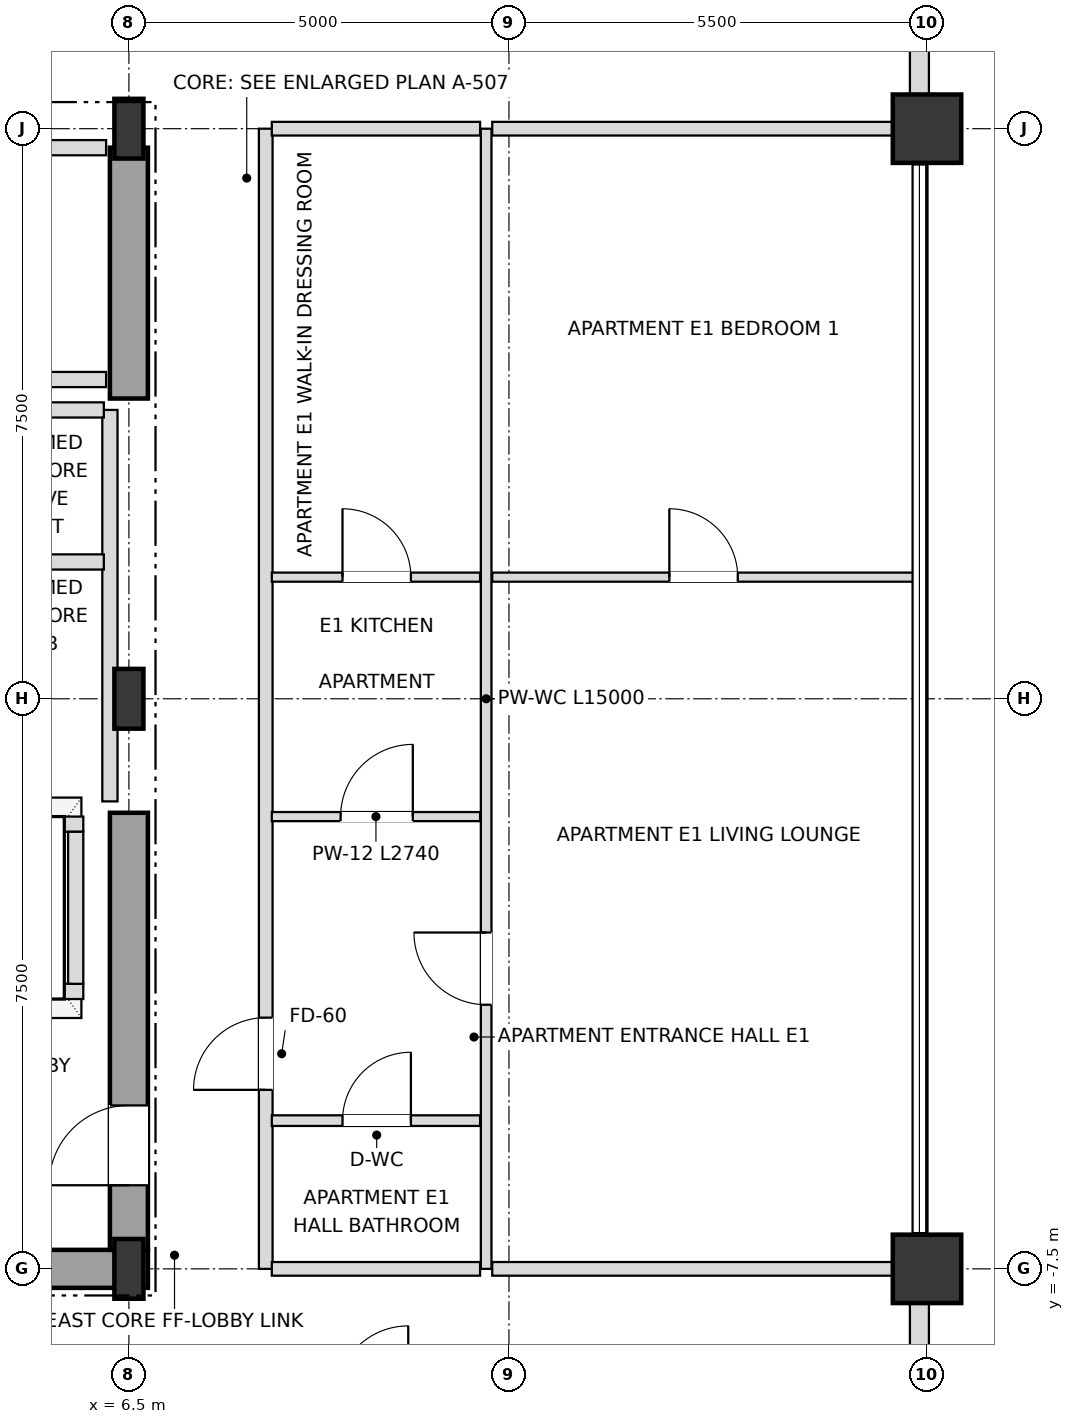
"""IFC4 building model, lengths in metres.
Left out: names, types, materials, properties, quantities, classifications, styles, units other than length and angle.
Written with IfcOpenShell. Run it as: python <this file> out.ifc"""

import sys

from ifc_helpers import new_model, si_unit, direction, frame, frame_2d, origin, origin_2d, place, context, subcontext, project, spatial, rectangle, i_section, extrude, element, fill, save


model = new_model("IFC4")
c1 = context("Model", 3, precision=1e-05, world=origin(), true_north=direction((0.0, 1.0)))
c2 = subcontext(c1, "Body", "Model", "MODEL_VIEW")
j1 = project(units=[si_unit("LENGTHUNIT", "METRE"), si_unit("PLANEANGLEUNIT", "RADIAN")], contexts=[c1])
p1 = place(None, origin())
s1 = spatial("IfcSite", under=j1, at=p1, CompositionType="ELEMENT")
p2 = place(p1, origin())
s2 = spatial("IfcBuilding", under=s1, at=p2, CompositionType="ELEMENT")
p3 = place(p2, frame((0.0, 0.0, 287.1)))
s3 = spatial("IfcBuildingStorey", under=s2, at=p3, CompositionType="ELEMENT", Elevation=287.1)
for number, where, z_axis, x_axis in (
    (1, (6.5, -7.5, 0.0), (0.0, 0.0, 1.0), (1.0, 0.0, 0.0)),
    (2, (6.5, 0.0, 0.0), (0.0, 0.0, 1.0), (1.0, 0.0, 0.0)),
    (3, (6.5, 7.5, 0.0), (0.0, 0.0, 1.0), (1.0, 0.0, 0.0)),
):
    element("IfcColumn", number, at=place(p3, frame(where, z_axis=z_axis, x_axis=x_axis)), inside=s3, PredefinedType="COLUMN", context=c2, shape_type="SweptSolid", body=[
        extrude(i_section(OverallWidth=0.382, OverallDepth=0.786, WebThickness=0.02, FlangeThickness=0.033, at=origin_2d()), origin(), (0.0, 0.0, 1.0), 3.6),
    ])
for number, where, z_axis, x_axis in (
    (4, (17.0, -7.5, 0.0), (0.0, 0.0, 1.0), (1.0, 0.0, 0.0)),
    (5, (17.0, 7.5, 0.0), (0.0, 0.0, 1.0), (1.0, 0.0, 0.0)),
):
    element("IfcColumn", number, at=place(p3, frame(where, z_axis=z_axis, x_axis=x_axis)), inside=s3, PredefinedType="USERDEFINED", context=c2, shape_type="SweptSolid", body=[
        extrude(rectangle(XDim=0.9, YDim=0.9, at=origin_2d()), origin(), (0.0, 0.0, 1.0), 3.6),
    ])
p4 = place(p3, frame((16.9, -12.555, 0.0), z_axis=(0.0, 0.0, 1.0), x_axis=(0.0, 1.0, 0.0)))
e6 = element("IfcWall", 6, at=p4, inside=s3, PredefinedType="SOLIDWALL", context=c2, shape_type="SweptSolid", body=[
    extrude(rectangle(XDim=4.61, YDim=0.25, at=frame_2d((2.305, 0.0))), origin(), (0.0, 0.0, 1.0), 2.748),
])
p5 = place(p4, frame((1.405, 0.0, 0.72)))
e7 = element("IfcOpeningElement", 7, at=p5, cuts=e6, PredefinedType="OPENING", context=c2, shape_type="SweptSolid", body=[
    extrude(rectangle(XDim=1.8, YDim=1.68, at=frame_2d((0.9, 0.84))), frame((0.0, 0.135, 0.0), z_axis=(0.0, -1.0, 0.0), x_axis=(1.0, 0.0, 0.0)), (0.0, 0.0, 1.0), 0.27),
])
p6 = place(p3, frame((16.9, 7.945, 0.0), z_axis=(0.0, 0.0, 1.0), x_axis=(0.0, 1.0, 0.0)))
e8 = element("IfcWall", 8, at=p6, inside=s3, PredefinedType="SOLIDWALL", context=c2, shape_type="SweptSolid", body=[
    extrude(rectangle(XDim=4.61, YDim=0.25, at=frame_2d((2.305, 0.0))), origin(), (0.0, 0.0, 1.0), 2.748),
])
p7 = place(p6, frame((1.405, 0.0, 0.72)))
e9 = element("IfcOpeningElement", 9, at=p7, cuts=e8, PredefinedType="OPENING", context=c2, shape_type="SweptSolid", body=[
    extrude(rectangle(XDim=1.8, YDim=1.68, at=frame_2d((0.9, 0.84))), frame((0.0, 0.135, 0.0), z_axis=(0.0, -1.0, 0.0), x_axis=(1.0, 0.0, 0.0)), (0.0, 0.0, 1.0), 0.27),
])
p8 = place(p3, frame((0.0, -7.5, 0.0), z_axis=(0.0, 0.0, 1.0), x_axis=(1.0, 0.0, 0.0)))
e10 = element("IfcWall", 10, at=p8, inside=s3, PredefinedType="SHEAR", context=c2, shape_type="SweptSolid", body=[
    extrude(rectangle(XDim=6.75, YDim=0.5, at=frame_2d((3.375, 0.0))), origin(), (0.0, 0.0, 1.0), 3.38),
])
p9 = place(p3, frame((6.5, -7.25, 0.0), z_axis=(0.0, 0.0, 1.0), x_axis=(0.0, 1.0, 0.0)))
e11 = element("IfcWall", 11, at=p9, inside=s3, PredefinedType="SHEAR", context=c2, shape_type="SweptSolid", body=[
    extrude(rectangle(XDim=5.75, YDim=0.5, at=frame_2d((2.875, 0.0))), origin(), (0.0, 0.0, 1.0), 3.38),
])
p10 = place(p9, frame((0.85, 0.0, 0.0)))
e12 = element("IfcOpeningElement", 12, at=p10, cuts=e11, PredefinedType="OPENING", context=c2, shape_type="SweptSolid", body=[
    extrude(rectangle(XDim=1.05, YDim=2.15, at=frame_2d((0.525, 1.075))), frame((0.0, 0.26, 0.0), z_axis=(0.0, -1.0, 0.0), x_axis=(1.0, 0.0, 0.0)), (0.0, 0.0, 1.0), 0.52),
])
p11 = place(p3, frame((6.5, 3.95, 0.0), z_axis=(0.0, 0.0, 1.0), x_axis=(0.0, 1.0, 0.0)))
e13 = element("IfcWall", 13, at=p11, inside=s3, PredefinedType="SHEAR", context=c2, shape_type="SweptSolid", body=[
    extrude(rectangle(XDim=3.3, YDim=0.5, at=frame_2d((1.65, 0.0))), origin(), (0.0, 0.0, 1.0), 3.38),
])
p12 = place(p3, frame((1.8, -3.85, 0.0), z_axis=(0.0, 0.0, 1.0), x_axis=(1.0, 0.0, 0.0)))
e14 = element("IfcWall", 14, at=p12, inside=s3, PredefinedType="SOLIDWALL", context=c2, shape_type="SweptSolid", body=[
    extrude(rectangle(XDim=4.1, YDim=0.2, at=frame_2d((2.05, 0.0))), origin(), (0.0, 0.0, 1.0), 3.38),
])
p13 = place(p12, frame((0.45, 0.0, 0.0)))
e15 = element("IfcOpeningElement", 15, at=p13, cuts=e14, PredefinedType="OPENING", context=c2, shape_type="SweptSolid", body=[
    extrude(rectangle(XDim=1.2, YDim=2.2, at=frame_2d((0.6, 1.1))), frame((0.0, 0.11, 0.0), z_axis=(0.0, -1.0, 0.0), x_axis=(1.0, 0.0, 0.0)), (0.0, 0.0, 1.0), 0.22),
])
p14 = place(p12, frame((2.45, 0.0, 0.0)))
e16 = element("IfcOpeningElement", 16, at=p14, cuts=e14, PredefinedType="OPENING", context=c2, shape_type="SweptSolid", body=[
    extrude(rectangle(XDim=1.2, YDim=2.2, at=frame_2d((0.6, 1.1))), frame((0.0, 0.11, 0.0), z_axis=(0.0, -1.0, 0.0), x_axis=(1.0, 0.0, 0.0)), (0.0, 0.0, 1.0), 0.22),
])
p15 = place(p3, frame((1.8, -1.65, 0.0), z_axis=(0.0, 0.0, 1.0), x_axis=(1.0, 0.0, 0.0)))
e17 = element("IfcWall", 17, at=p15, inside=s3, PredefinedType="SOLIDWALL", context=c2, shape_type="SweptSolid", body=[
    extrude(rectangle(XDim=4.1, YDim=0.2, at=frame_2d((2.05, 0.0))), origin(), (0.0, 0.0, 1.0), 3.38),
])
p16 = place(p3, frame((5.8, -3.75, 0.0), z_axis=(0.0, 0.0, 1.0), x_axis=(0.0, 1.0, 0.0)))
e18 = element("IfcWall", 18, at=p16, inside=s3, PredefinedType="SOLIDWALL", context=c2, shape_type="SweptSolid", body=[
    extrude(rectangle(XDim=2.0, YDim=0.2, at=frame_2d((1.0, 0.0))), origin(), (0.0, 0.0, 1.0), 3.38),
])
p17 = place(p3, frame((6.25, -1.35, 0.0), z_axis=(0.0, 0.0, 1.0), x_axis=(0.0, 1.0, 0.0)))
e19 = element("IfcWall", 19, at=p17, inside=s3, PredefinedType="SOLIDWALL", context=c2, shape_type="SweptSolid", body=[
    extrude(rectangle(XDim=5.15, YDim=0.2, at=frame_2d((2.575, 0.0))), origin(), (0.0, 0.0, 1.0), 3.38),
])
p18 = place(p3, frame((8.3, -7.5, 0.0), z_axis=(0.0, 0.0, 1.0), x_axis=(0.0, 1.0, 0.0)))
e20 = element("IfcWall", 20, at=p18, inside=s3, PredefinedType="PARTITIONING", context=c2, shape_type="SweptSolid", body=[
    extrude(rectangle(XDim=15.0, YDim=0.18, at=frame_2d((7.5, 0.0))), origin(), (0.0, 0.0, 1.0), 3.38),
])
p19 = place(p18, frame((2.355, 0.0, 0.0)))
e21 = element("IfcOpeningElement", 21, at=p19, cuts=e20, PredefinedType="OPENING", context=c2, shape_type="SweptSolid", body=[
    extrude(rectangle(XDim=0.95, YDim=2.15, at=frame_2d((0.475, 1.075))), frame((0.0, 0.1, 0.0), z_axis=(0.0, -1.0, 0.0), x_axis=(1.0, 0.0, 0.0)), (0.0, 0.0, 1.0), 0.2),
])
p20 = place(p3, frame((11.2, -7.5, 0.0), z_axis=(0.0, 0.0, 1.0), x_axis=(0.0, 1.0, 0.0)))
e22 = element("IfcWall", 22, at=p20, inside=s3, PredefinedType="PARTITIONING", context=c2, shape_type="SweptSolid", body=[
    extrude(rectangle(XDim=15.0, YDim=0.14, at=frame_2d((7.5, 0.0))), origin(), (0.0, 0.0, 1.0), 3.38),
])
p21 = place(p20, frame((3.475, 0.0, 0.0)))
e23 = element("IfcOpeningElement", 23, at=p21, cuts=e22, PredefinedType="OPENING", context=c2, shape_type="SweptSolid", body=[
    extrude(rectangle(XDim=0.95, YDim=2.1, at=frame_2d((0.475, 1.05))), frame((0.0, 0.08, 0.0), z_axis=(0.0, -1.0, 0.0), x_axis=(1.0, 0.0, 0.0)), (0.0, 0.0, 1.0), 0.16),
])
p22 = place(p3, frame((8.38, -7.5, 0.0), z_axis=(0.0, 0.0, 1.0), x_axis=(1.0, 0.0, 0.0)))
e24 = element("IfcWall", 24, at=p22, inside=s3, PredefinedType="PARTITIONING", context=c2, shape_type="SweptSolid", body=[
    extrude(rectangle(XDim=2.74, YDim=0.18, at=frame_2d((1.37, 0.0))), origin(), (0.0, 0.0, 1.0), 2.826),
])
p23 = place(p3, frame((11.28, -7.5, 0.0), z_axis=(0.0, 0.0, 1.0), x_axis=(1.0, 0.0, 0.0)))
e25 = element("IfcWall", 25, at=p23, inside=s3, PredefinedType="PARTITIONING", context=c2, shape_type="SweptSolid", body=[
    extrude(rectangle(XDim=5.62, YDim=0.18, at=frame_2d((2.81, 0.0))), origin(), (0.0, 0.0, 1.0), 2.826),
])
p24 = place(p3, frame((8.38, -5.55, 0.0), z_axis=(0.0, 0.0, 1.0), x_axis=(1.0, 0.0, 0.0)))
e26 = element("IfcWall", 26, at=p24, inside=s3, PredefinedType="PARTITIONING", context=c2, shape_type="SweptSolid", body=[
    extrude(rectangle(XDim=2.74, YDim=0.14, at=frame_2d((1.37, 0.0))), origin(), (0.0, 0.0, 1.0), 3.38),
])
p25 = place(p24, frame((0.93, 0.0, 0.0)))
e27 = element("IfcOpeningElement", 27, at=p25, cuts=e26, PredefinedType="OPENING", context=c2, shape_type="SweptSolid", body=[
    extrude(rectangle(XDim=0.9, YDim=2.1, at=frame_2d((0.45, 1.05))), frame((0.0, 0.08, 0.0), z_axis=(0.0, -1.0, 0.0), x_axis=(1.0, 0.0, 0.0)), (0.0, 0.0, 1.0), 0.16),
])
p26 = place(p3, frame((8.38, -1.55, 0.0), z_axis=(0.0, 0.0, 1.0), x_axis=(1.0, 0.0, 0.0)))
e28 = element("IfcWall", 28, at=p26, inside=s3, PredefinedType="PARTITIONING", context=c2, shape_type="SweptSolid", body=[
    extrude(rectangle(XDim=2.74, YDim=0.12, at=frame_2d((1.37, 0.0))), origin(), (0.0, 0.0, 1.0), 3.38),
])
p27 = place(p26, frame((0.905, 0.0, 0.0)))
e29 = element("IfcOpeningElement", 29, at=p27, cuts=e28, PredefinedType="OPENING", context=c2, shape_type="SweptSolid", body=[
    extrude(rectangle(XDim=0.95, YDim=2.1, at=frame_2d((0.475, 1.05))), frame((0.0, 0.07, 0.0), z_axis=(0.0, -1.0, 0.0), x_axis=(1.0, 0.0, 0.0)), (0.0, 0.0, 1.0), 0.14),
])
p28 = place(p3, frame((8.38, 1.6, 0.0), z_axis=(0.0, 0.0, 1.0), x_axis=(1.0, 0.0, 0.0)))
e30 = element("IfcWall", 30, at=p28, inside=s3, PredefinedType="PARTITIONING", context=c2, shape_type="SweptSolid", body=[
    extrude(rectangle(XDim=2.74, YDim=0.12, at=frame_2d((1.37, 0.0))), origin(), (0.0, 0.0, 1.0), 3.38),
])
p29 = place(p28, frame((0.93, 0.0, 0.0)))
e31 = element("IfcOpeningElement", 31, at=p29, cuts=e30, PredefinedType="OPENING", context=c2, shape_type="SweptSolid", body=[
    extrude(rectangle(XDim=0.9, YDim=2.1, at=frame_2d((0.45, 1.05))), frame((0.0, 0.07, 0.0), z_axis=(0.0, -1.0, 0.0), x_axis=(1.0, 0.0, 0.0)), (0.0, 0.0, 1.0), 0.14),
])
p30 = place(p3, frame((11.28, 1.6, 0.0), z_axis=(0.0, 0.0, 1.0), x_axis=(1.0, 0.0, 0.0)))
e32 = element("IfcWall", 32, at=p30, inside=s3, PredefinedType="PARTITIONING", context=c2, shape_type="SweptSolid", body=[
    extrude(rectangle(XDim=5.54, YDim=0.12, at=frame_2d((2.77, 0.0))), origin(), (0.0, 0.0, 1.0), 3.018),
])
p31 = place(p30, frame((2.33, 0.0, 0.0)))
e33 = element("IfcOpeningElement", 33, at=p31, cuts=e32, PredefinedType="OPENING", context=c2, shape_type="SweptSolid", body=[
    extrude(rectangle(XDim=0.9, YDim=2.1, at=frame_2d((0.45, 1.05))), frame((0.0, 0.07, 0.0), z_axis=(0.0, -1.0, 0.0), x_axis=(1.0, 0.0, 0.0)), (0.0, 0.0, 1.0), 0.14),
])
for number, where, z_axis, x_axis in (
    (34, (4.13, 1.8, 0.0), (0.0, 0.0, 1.0), (1.0, 0.0, 0.0)),
    (35, (4.13, 3.8, 0.0), (0.0, 0.0, 1.0), (1.0, 0.0, 0.0)),
):
    element("IfcWall", number, at=place(p3, frame(where, z_axis=z_axis, x_axis=x_axis)), inside=s3, PredefinedType="SOLIDWALL", context=c2, shape_type="SweptSolid", body=[
        extrude(rectangle(XDim=2.04, YDim=0.2, at=frame_2d((1.02, 0.0))), origin(), (0.0, 0.0, 1.0), 3.38),
    ])
for number, where, z_axis, x_axis in (
    (36, (4.13, 4.2, 0.0), (0.0, 0.0, 1.0), (1.0, 0.0, 0.0)),
    (37, (4.13, 7.25, 0.0), (0.0, 0.0, 1.0), (1.0, 0.0, 0.0)),
):
    element("IfcWall", number, at=place(p3, frame(where, z_axis=z_axis, x_axis=x_axis)), inside=s3, PredefinedType="SOLIDWALL", context=c2, shape_type="SweptSolid", body=[
        extrude(rectangle(XDim=2.07, YDim=0.2, at=frame_2d((1.035, 0.0))), origin(), (0.0, 0.0, 1.0), 3.38),
    ])
p32 = place(p3, frame((8.38, 7.5, 0.0), z_axis=(0.0, 0.0, 1.0), x_axis=(1.0, 0.0, 0.0)))
e38 = element("IfcWall", 38, at=p32, inside=s3, PredefinedType="PARTITIONING", context=c2, shape_type="SweptSolid", body=[
    extrude(rectangle(XDim=2.74, YDim=0.18, at=frame_2d((1.37, 0.0))), origin(), (0.0, 0.0, 1.0), 2.826),
])
p33 = place(p3, frame((11.28, 7.5, 0.0), z_axis=(0.0, 0.0, 1.0), x_axis=(1.0, 0.0, 0.0)))
e39 = element("IfcWall", 39, at=p33, inside=s3, PredefinedType="PARTITIONING", context=c2, shape_type="SweptSolid", body=[
    extrude(rectangle(XDim=5.62, YDim=0.18, at=frame_2d((2.81, 0.0))), origin(), (0.0, 0.0, 1.0), 2.826),
])
p34 = place(p10, origin())
e40 = element("IfcDoor", 40, at=p34, inside=s3, OperationType="SINGLE_SWING_LEFT", PredefinedType="DOOR", context=c2, shape_type="SweptSolid", body=[
    extrude(rectangle(XDim=1.05, YDim=2.15, at=frame_2d((0.525, 1.075))), frame((0.0, 0.025, 0.0), z_axis=(0.0, -1.0, 0.0), x_axis=(1.0, 0.0, 0.0)), (0.0, 0.0, 1.0), 0.05),
])
fill(e12, e40)
p35 = place(p25, origin())
e41 = element("IfcDoor", 41, at=p35, inside=s3, OperationType="SINGLE_SWING_RIGHT", PredefinedType="DOOR", context=c2, shape_type="SweptSolid", body=[
    extrude(rectangle(XDim=0.9, YDim=2.1, at=frame_2d((0.45, 1.05))), frame((0.0, 0.025, 0.0), z_axis=(0.0, -1.0, 0.0), x_axis=(1.0, 0.0, 0.0)), (0.0, 0.0, 1.0), 0.05),
])
fill(e27, e41)
p36 = place(p19, origin())
e42 = element("IfcDoor", 42, at=p36, inside=s3, OperationType="SINGLE_SWING_LEFT", PredefinedType="DOOR", context=c2, shape_type="SweptSolid", body=[
    extrude(rectangle(XDim=0.95, YDim=2.15, at=frame_2d((0.475, 1.075))), frame((0.0, 0.025, 0.0), z_axis=(0.0, -1.0, 0.0), x_axis=(1.0, 0.0, 0.0)), (0.0, 0.0, 1.0), 0.05),
])
fill(e21, e42)
p37 = place(p27, origin())
e43 = element("IfcDoor", 43, at=p37, inside=s3, OperationType="SINGLE_SWING_RIGHT", PredefinedType="DOOR", context=c2, shape_type="SweptSolid", body=[
    extrude(rectangle(XDim=0.95, YDim=2.1, at=frame_2d((0.475, 1.05))), frame((0.0, 0.025, 0.0), z_axis=(0.0, -1.0, 0.0), x_axis=(1.0, 0.0, 0.0)), (0.0, 0.0, 1.0), 0.05),
])
fill(e29, e43)
p38 = place(p29, origin())
e44 = element("IfcDoor", 44, at=p38, inside=s3, OperationType="SINGLE_SWING_LEFT", PredefinedType="DOOR", context=c2, shape_type="SweptSolid", body=[
    extrude(rectangle(XDim=0.9, YDim=2.1, at=frame_2d((0.45, 1.05))), frame((0.0, 0.025, 0.0), z_axis=(0.0, -1.0, 0.0), x_axis=(1.0, 0.0, 0.0)), (0.0, 0.0, 1.0), 0.05),
])
fill(e31, e44)
p39 = place(p21, origin())
e45 = element("IfcDoor", 45, at=p39, inside=s3, OperationType="SINGLE_SWING_RIGHT", PredefinedType="DOOR", context=c2, shape_type="SweptSolid", body=[
    extrude(rectangle(XDim=0.95, YDim=2.1, at=frame_2d((0.475, 1.05))), frame((0.0, 0.025, 0.0), z_axis=(0.0, -1.0, 0.0), x_axis=(1.0, 0.0, 0.0)), (0.0, 0.0, 1.0), 0.05),
])
fill(e23, e45)
p40 = place(p31, origin())
e46 = element("IfcDoor", 46, at=p40, inside=s3, OperationType="SINGLE_SWING_LEFT", PredefinedType="DOOR", context=c2, shape_type="SweptSolid", body=[
    extrude(rectangle(XDim=0.9, YDim=2.1, at=frame_2d((0.45, 1.05))), frame((0.0, 0.025, 0.0), z_axis=(0.0, -1.0, 0.0), x_axis=(1.0, 0.0, 0.0)), (0.0, 0.0, 1.0), 0.05),
])
fill(e33, e46)
save(model, sys.argv[1])
